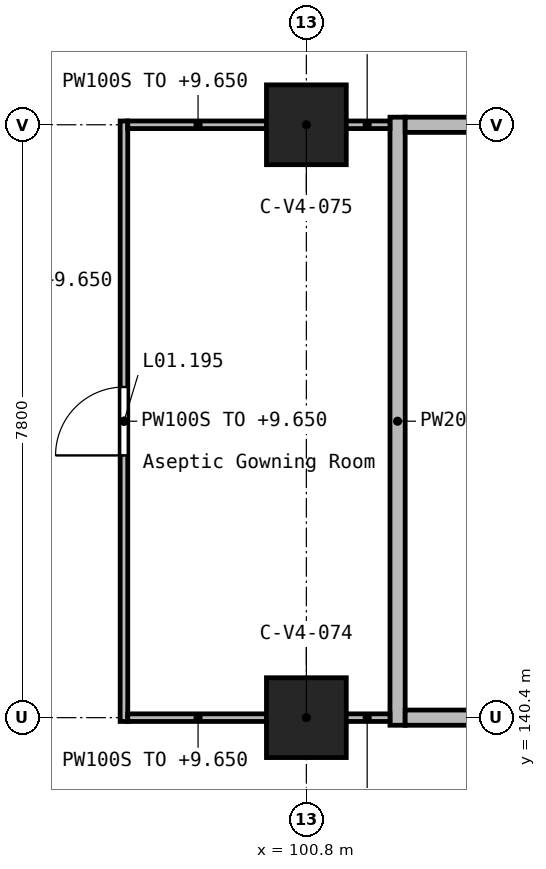
"""IFC4 building model, lengths in metres.
Left out: names, types, materials, properties, quantities, classifications, styles, units other than length and angle.
Written with IfcOpenShell. Run it as: python <this file> out.ifc"""

import sys

from ifc_helpers import new_model, si_unit, direction, frame, frame_2d, origin, origin_2d, place, context, subcontext, project, spatial, rectangle, extrude, element, fill, save


model = new_model("IFC4")
c1 = context("Model", 3, precision=1e-05, world=origin(), true_north=direction((0.0, 1.0)))
c2 = subcontext(c1, "Body", "Model", "MODEL_VIEW")
j1 = project(units=[si_unit("LENGTHUNIT", "METRE"), si_unit("PLANEANGLEUNIT", "RADIAN")], contexts=[c1])
p1 = place(None, origin())
s1 = spatial("IfcSite", under=j1, at=p1, CompositionType="ELEMENT")
p2 = place(p1, origin())
s2 = spatial("IfcBuilding", under=s1, at=p2, CompositionType="ELEMENT")
p3 = place(p2, frame((0.0, 0.0, 5.4)))
s3 = spatial("IfcBuildingStorey", under=s2, at=p3, CompositionType="ELEMENT", Elevation=5.4)
for number, where, z_axis, x_axis in (
    (1, (100.8, 140.4, 0.0), (0.0, 0.0, 1.0), (1.0, 0.0, 0.0)),
    (2, (100.8, 148.2, 0.0), (0.0, 0.0, 1.0), (1.0, 0.0, 0.0)),
):
    element("IfcColumn", number, at=place(p3, frame(where, z_axis=z_axis, x_axis=x_axis)), inside=s3, PredefinedType="COLUMN", context=c2, shape_type="SweptSolid", body=[
        extrude(rectangle(XDim=1.05, YDim=1.05, at=origin_2d()), origin(), (0.0, 0.0, 1.0), 4.5),
    ])
p4 = place(p3, frame((102.0, 140.3, 0.0), z_axis=(0.0, 0.0, 1.0), x_axis=(0.0, 1.0, 0.0)))
e3 = element("IfcWall", 3, at=p4, inside=s3, PredefinedType="SOLIDWALL", context=c2, shape_type="SweptSolid", body=[
    extrude(rectangle(XDim=8.0, YDim=0.2, at=frame_2d((4.0, 0.0))), origin(), (0.0, 0.0, 1.0), 4.25),
])
p5 = place(p3, frame((102.1, 140.4, 0.0), z_axis=(0.0, 0.0, 1.0), x_axis=(1.0, 0.0, 0.0)))
e4 = element("IfcWall", 4, at=p5, inside=s3, PredefinedType="SOLIDWALL", context=c2, shape_type="SweptSolid", body=[
    extrude(rectangle(XDim=6.6, YDim=0.2, at=frame_2d((3.3, 0.0))), origin(), (0.0, 0.0, 1.0), 4.25),
])
p6 = place(p5, frame((3.0, 0.0, 0.0)))
e5 = element("IfcOpeningElement", 5, at=p6, cuts=e4, PredefinedType="OPENING", context=c2, shape_type="SweptSolid", body=[
    extrude(rectangle(XDim=1.0, YDim=2.1, at=frame_2d((0.5, 1.05))), frame((0.0, 0.11, 0.0), z_axis=(0.0, -1.0, 0.0), x_axis=(1.0, 0.0, 0.0)), (0.0, 0.0, 1.0), 0.22),
])
p7 = place(p3, frame((102.1, 148.2, 0.0), z_axis=(0.0, 0.0, 1.0), x_axis=(1.0, 0.0, 0.0)))
e6 = element("IfcWall", 6, at=p7, inside=s3, PredefinedType="SOLIDWALL", context=c2, shape_type="SweptSolid", body=[
    extrude(rectangle(XDim=6.6, YDim=0.2, at=frame_2d((3.3, 0.0))), origin(), (0.0, 0.0, 1.0), 4.25),
])
p8 = place(p3, frame((98.4, 140.35, 0.0), z_axis=(0.0, 0.0, 1.0), x_axis=(0.0, 1.0, 0.0)))
e7 = element("IfcWall", 7, at=p8, inside=s3, PredefinedType="PARTITIONING", context=c2, shape_type="SweptSolid", body=[
    extrude(rectangle(XDim=7.9, YDim=0.1, at=frame_2d((3.95, 0.0))), origin(), (0.0, 0.0, 1.0), 4.25),
])
p9 = place(p8, frame((3.5, 0.0, 0.0)))
e8 = element("IfcOpeningElement", 8, at=p9, cuts=e7, PredefinedType="OPENING", context=c2, shape_type="SweptSolid", body=[
    extrude(rectangle(XDim=0.9, YDim=2.1, at=frame_2d((0.45, 1.05))), frame((0.0, 0.06, 0.0), z_axis=(0.0, -1.0, 0.0), x_axis=(1.0, 0.0, 0.0)), (0.0, 0.0, 1.0), 0.12),
])
p10 = place(p3, frame((98.45, 140.4, 0.0), z_axis=(0.0, 0.0, 1.0), x_axis=(1.0, 0.0, 0.0)))
e9 = element("IfcWall", 9, at=p10, inside=s3, PredefinedType="PARTITIONING", context=c2, shape_type="SweptSolid", body=[
    extrude(rectangle(XDim=1.85, YDim=0.1, at=frame_2d((0.925, 0.0))), origin(), (0.0, 0.0, 1.0), 4.25),
])
p11 = place(p3, frame((101.3, 140.4, 0.0), z_axis=(0.0, 0.0, 1.0), x_axis=(1.0, 0.0, 0.0)))
e10 = element("IfcWall", 10, at=p11, inside=s3, PredefinedType="PARTITIONING", context=c2, shape_type="SweptSolid", body=[
    extrude(rectangle(XDim=0.6, YDim=0.1, at=frame_2d((0.3, 0.0))), origin(), (0.0, 0.0, 1.0), 4.25),
])
p12 = place(p3, frame((98.45, 148.2, 0.0), z_axis=(0.0, 0.0, 1.0), x_axis=(1.0, 0.0, 0.0)))
e11 = element("IfcWall", 11, at=p12, inside=s3, PredefinedType="PARTITIONING", context=c2, shape_type="SweptSolid", body=[
    extrude(rectangle(XDim=1.85, YDim=0.1, at=frame_2d((0.925, 0.0))), origin(), (0.0, 0.0, 1.0), 4.25),
])
p13 = place(p3, frame((101.3, 148.2, 0.0), z_axis=(0.0, 0.0, 1.0), x_axis=(1.0, 0.0, 0.0)))
e12 = element("IfcWall", 12, at=p13, inside=s3, PredefinedType="PARTITIONING", context=c2, shape_type="SweptSolid", body=[
    extrude(rectangle(XDim=0.6, YDim=0.1, at=frame_2d((0.3, 0.0))), origin(), (0.0, 0.0, 1.0), 4.25),
])
p14 = place(p9, frame((0.9, 0.0, 0.0), z_axis=(0.0, 0.0, 1.0), x_axis=(-1.0, 0.0, 0.0)))
e13 = element("IfcDoor", 13, at=p14, inside=s3, OperationType="SINGLE_SWING_RIGHT", PredefinedType="DOOR", context=c2, shape_type="SweptSolid", body=[
    extrude(rectangle(XDim=0.9, YDim=2.1, at=frame_2d((0.45, 1.05))), frame((0.0, 0.025, 0.0), z_axis=(0.0, -1.0, 0.0), x_axis=(1.0, 0.0, 0.0)), (0.0, 0.0, 1.0), 0.05),
])
fill(e8, e13)
save(model, sys.argv[1])
